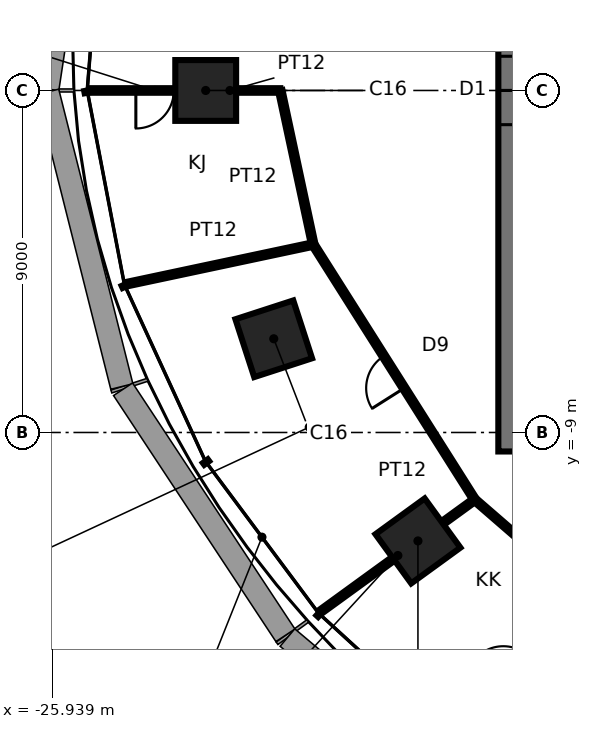
"""IFC4 building model, lengths in metres.
Left out: names, types, materials, properties, quantities, classifications, styles, units other than length and angle.
Written with IfcOpenShell. Run it as: python <this file> out.ifc"""

import sys

from ifc_helpers import new_model, si_unit, direction, frame, frame_2d, origin, origin_2d, place, context, subcontext, project, spatial, rectangle, extrude, element, fill, save


model = new_model("IFC4")
c1 = context("Model", 3, precision=1e-05, world=origin(), true_north=direction((0.0, 1.0)))
c2 = subcontext(c1, "Body", "Model", "MODEL_VIEW")
j1 = project(units=[si_unit("LENGTHUNIT", "METRE"), si_unit("PLANEANGLEUNIT", "RADIAN")], contexts=[c1])
p1 = place(None, origin())
s1 = spatial("IfcSite", under=j1, at=p1, CompositionType="ELEMENT")
p2 = place(p1, origin())
s2 = spatial("IfcBuilding", under=s1, at=p2, CompositionType="ELEMENT")
p3 = place(p2, frame((0.0, 0.0, 96.3)))
s3 = spatial("IfcBuildingStorey", under=s2, at=p3, CompositionType="ELEMENT", Elevation=96.3)
for number, where, z_axis, x_axis in (
    (1, (-21.9, 0.0, 0.0), (0.0, 0.0, 1.0), (-1.0, 0.0, 0.0)),
    (2, (-20.109, -6.534, 0.0), (0.0, 0.0, 1.0), (-0.951, -0.309, 0.0)),
    (3, (-16.315, -11.854, 0.0), (0.0, 0.0, 1.0), (-0.809, -0.588, 0.0)),
):
    element("IfcColumn", number, at=place(p3, frame(where, z_axis=z_axis, x_axis=x_axis)), inside=s3, PredefinedType="COLUMN", context=c2, shape_type="SweptSolid", body=[
        extrude(rectangle(XDim=1.6, YDim=1.6, at=origin_2d()), origin(), (0.0, 0.0, 1.0), 3.9),
    ])
p4 = place(p3, frame((-13.7, 9.5, 0.0), z_axis=(0.0, 0.0, 1.0), x_axis=(0.0, -1.0, 0.0)))
e4 = element("IfcWall", 4, at=p4, inside=s3, PredefinedType="SHEAR", context=c2, shape_type="SweptSolid", body=[
    extrude(rectangle(XDim=19.0, YDim=1.0, at=frame_2d((9.5, 0.0))), origin(), (0.0, 0.0, 1.0), 3.9),
])
p5 = place(p4, frame((8.6, 0.0, 0.0)))
e5 = element("IfcOpeningElement", 5, at=p5, cuts=e4, PredefinedType="OPENING", context=c2, shape_type="SweptSolid", body=[
    extrude(rectangle(XDim=1.8, YDim=2.4, at=frame_2d((0.9, 1.2))), frame((0.0, 0.51, 0.0), z_axis=(0.0, -1.0, 0.0), x_axis=(1.0, 0.0, 0.0)), (0.0, 0.0, 1.0), 1.02),
])
p6 = place(p3, frame((-19.07, -4.053, 0.0), z_axis=(0.0, 0.0, 1.0), x_axis=(-0.209484846429, 0.977811893524, 0.0)))
e6 = element("IfcWall", 6, at=p6, inside=s3, PredefinedType="PARTITIONING", context=c2, shape_type="SweptSolid", body=[
    extrude(rectangle(XDim=4.146, YDim=0.12, at=frame_2d((2.073, 0.0))), origin(), (0.0, 0.0, 1.0), 3.74),
])
p7 = place(p3, frame((-19.07, -4.053, 0.0), z_axis=(0.0, 0.0, 1.0), x_axis=(-0.978149046495, -0.207904888932, 0.0)))
e7 = element("IfcWall", 7, at=p7, inside=s3, PredefinedType="PARTITIONING", context=c2, shape_type="SweptSolid", body=[
    extrude(rectangle(XDim=5.0, YDim=0.12, at=frame_2d((2.5, 0.0))), origin(), (0.0, 0.0, 1.0), 3.74),
])
p8 = place(p3, frame((-14.821, -10.768, 0.0), z_axis=(0.0, 0.0, 1.0), x_axis=(-0.534710673456, 0.845035203818, 0.0)))
e8 = element("IfcWall", 8, at=p8, inside=s3, PredefinedType="PARTITIONING", context=c2, shape_type="SweptSolid", body=[
    extrude(rectangle(XDim=7.946, YDim=0.12, at=frame_2d((3.973, 0.0))), origin(), (0.0, 0.0, 1.0), 3.74),
])
p9 = place(p8, frame((3.473, 0.0, 0.0)))
e9 = element("IfcOpeningElement", 9, at=p9, cuts=e8, PredefinedType="OPENING", context=c2, shape_type="SweptSolid", body=[
    extrude(rectangle(XDim=1.0, YDim=2.4, at=frame_2d((0.5, 1.2))), frame((0.0, 0.07, 0.0), z_axis=(0.0, -1.0, 0.0), x_axis=(1.0, 0.0, 0.0)), (0.0, 0.0, 1.0), 0.14),
])
p10 = place(p3, frame((-14.821, -10.768, 0.0), z_axis=(0.0, 0.0, 1.0), x_axis=(-0.809042143657, -0.587750635718, 0.0)))
e10 = element("IfcWall", 10, at=p10, inside=s3, PredefinedType="PARTITIONING", context=c2, shape_type="SweptSolid", body=[
    extrude(rectangle(XDim=5.0, YDim=0.12, at=frame_2d((2.5, 0.0))), origin(), (0.0, 0.0, 1.0), 2.94),
])
p11 = place(p3, frame((-11.942, -13.263, 0.0), z_axis=(0.0, 0.0, 1.0), x_axis=(-0.755744060509, 0.654867097208, 0.0)))
e11 = element("IfcWall", 11, at=p11, inside=s3, PredefinedType="PARTITIONING", context=c2, shape_type="SweptSolid", body=[
    extrude(rectangle(XDim=3.809, YDim=0.12, at=frame_2d((1.905, 0.0))), origin(), (0.0, 0.0, 1.0), 3.74),
])
p12 = place(p3, frame((-15.288, -16.979, 0.0), z_axis=(0.0, 0.0, 1.0), x_axis=(0.669126573551, 0.743148456614, 0.0)))
e12 = element("IfcWall", 12, at=p12, inside=s3, PredefinedType="PARTITIONING", context=c2, shape_type="SweptSolid", body=[
    extrude(rectangle(XDim=5.0, YDim=0.12, at=frame_2d((2.5, 0.0))), origin(), (0.0, 0.0, 1.0), 3.74),
])
p13 = place(p12, frame((1.822, 0.0, 0.0)))
e13 = element("IfcOpeningElement", 13, at=p13, cuts=e12, PredefinedType="OPENING", context=c2, shape_type="SweptSolid", body=[
    extrude(rectangle(XDim=1.0, YDim=2.4, at=frame_2d((0.5, 1.2))), frame((0.0, 0.07, 0.0), z_axis=(0.0, -1.0, 0.0), x_axis=(1.0, 0.0, 0.0)), (0.0, 0.0, 1.0), 0.14),
])
p14 = place(p3, frame((-19.938, 0.0, 0.0), z_axis=(0.0, 0.0, 1.0), x_axis=(-1.0, 0.0, 0.0)))
e14 = element("IfcWall", 14, at=p14, inside=s3, PredefinedType="PARTITIONING", context=c2, shape_type="SweptSolid", body=[
    extrude(rectangle(XDim=5.0, YDim=0.12, at=frame_2d((2.5, 0.0))), origin(), (0.0, 0.0, 1.0), 2.94),
])
p15 = place(p14, frame((2.8, 0.0, 0.0)))
e15 = element("IfcOpeningElement", 15, at=p15, cuts=e14, PredefinedType="OPENING", context=c2, shape_type="SweptSolid", body=[
    extrude(rectangle(XDim=1.0, YDim=2.4, at=frame_2d((0.5, 1.2))), frame((0.0, 0.07, 0.0), z_axis=(0.0, -1.0, 0.0), x_axis=(1.0, 0.0, 0.0)), (0.0, 0.0, 1.0), 0.14),
])
p16 = place(p5, origin())
e16 = element("IfcDoor", 16, at=p16, inside=s3, OperationType="DOUBLE_DOOR_SINGLE_SWING", PredefinedType="DOOR", context=c2, shape_type="SweptSolid", body=[
    extrude(rectangle(XDim=1.72, YDim=2.36, at=frame_2d((0.9, 1.18))), frame((0.0, 0.025, 0.0), z_axis=(0.0, -1.0, 0.0), x_axis=(1.0, 0.0, 0.0)), (0.0, 0.0, 1.0), 0.05),
    extrude(rectangle(XDim=0.04, YDim=2.4, at=frame_2d((0.02, 1.2))), frame((0.0, 0.25, 0.0), z_axis=(0.0, -1.0, 0.0), x_axis=(1.0, 0.0, 0.0)), (0.0, 0.0, 1.0), 0.5),
    extrude(rectangle(XDim=0.04, YDim=2.4, at=frame_2d((1.78, 1.2))), frame((0.0, 0.25, 0.0), z_axis=(0.0, -1.0, 0.0), x_axis=(1.0, 0.0, 0.0)), (0.0, 0.0, 1.0), 0.5),
    extrude(rectangle(XDim=1.72, YDim=0.04, at=frame_2d((0.9, 2.38))), frame((0.0, 0.25, 0.0), z_axis=(0.0, -1.0, 0.0), x_axis=(1.0, 0.0, 0.0)), (0.0, 0.0, 1.0), 0.5),
])
fill(e5, e16)
p17 = place(p15, origin())
e17 = element("IfcDoor", 17, at=p17, inside=s3, OperationType="SINGLE_SWING_RIGHT", PredefinedType="DOOR", context=c2, shape_type="SweptSolid", body=[
    extrude(rectangle(XDim=1.0, YDim=2.4, at=frame_2d((0.5, 1.2))), frame((0.0, 0.025, 0.0), z_axis=(0.0, -1.0, 0.0), x_axis=(1.0, 0.0, 0.0)), (0.0, 0.0, 1.0), 0.05),
])
fill(e15, e17)
p18 = place(p9, origin())
e18 = element("IfcDoor", 18, at=p18, inside=s3, OperationType="SINGLE_SWING_LEFT", PredefinedType="DOOR", context=c2, shape_type="SweptSolid", body=[
    extrude(rectangle(XDim=1.0, YDim=2.4, at=frame_2d((0.5, 1.2))), frame((0.0, 0.025, 0.0), z_axis=(0.0, -1.0, 0.0), x_axis=(1.0, 0.0, 0.0)), (0.0, 0.0, 1.0), 0.05),
])
fill(e9, e18)
save(model, sys.argv[1])
